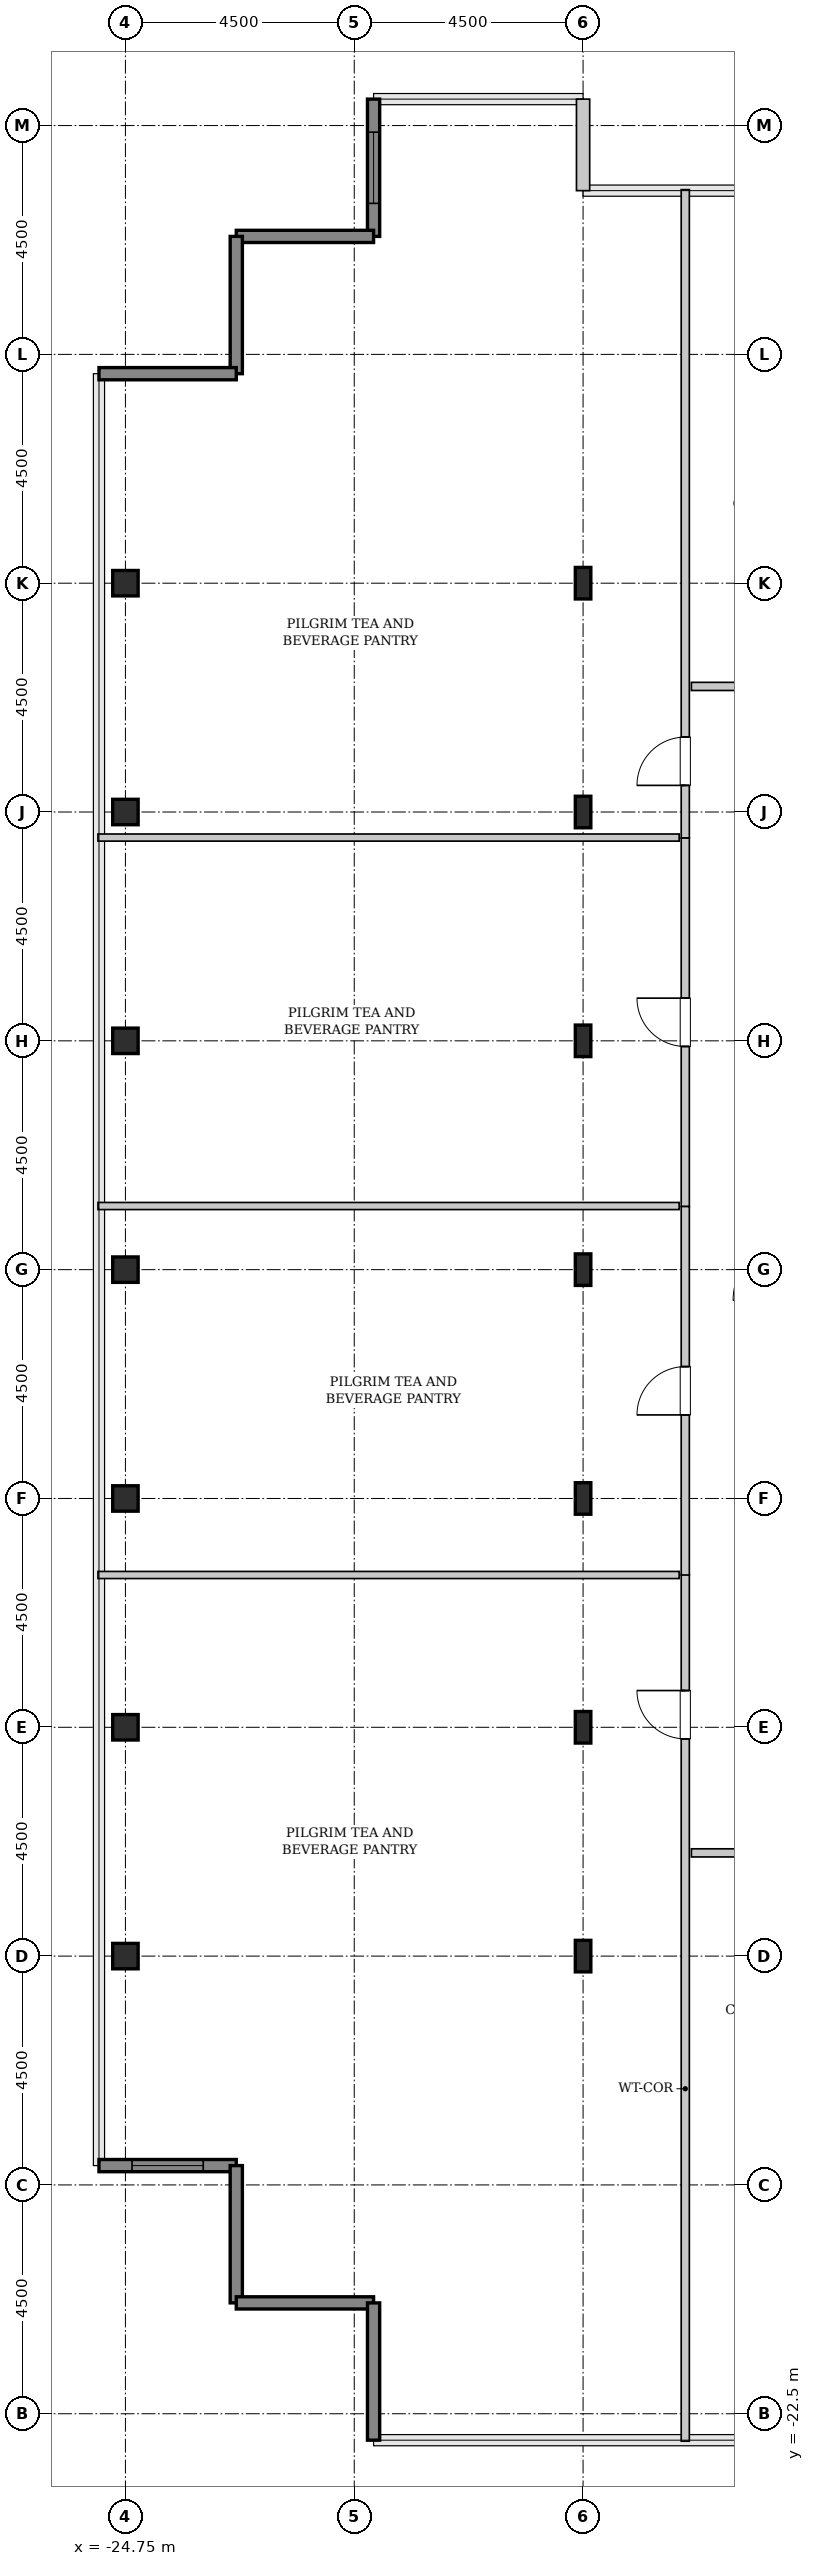
"""IFC4 building model, lengths in metres.
Left out: names, types, materials, properties, quantities, classifications, styles, units other than length and angle.
Written with IfcOpenShell. Run it as: python <this file> out.ifc"""

import sys

from ifc_helpers import new_model, si_unit, direction, frame, frame_2d, origin, origin_2d, place, context, subcontext, project, spatial, rectangle, hollow_rectangle, i_section, extrude, source, transform, mapped, element, fill, save


model = new_model("IFC4")
c1 = context("Model", 3, precision=1e-05, world=origin(), true_north=direction((0.0, 1.0)))
c2 = subcontext(c1, "Body", "Model", "MODEL_VIEW")
j1 = project(units=[si_unit("LENGTHUNIT", "METRE"), si_unit("PLANEANGLEUNIT", "RADIAN")], contexts=[c1])
p1 = place(None, origin())
s1 = spatial("IfcSite", under=j1, at=p1, CompositionType="ELEMENT")
p2 = place(p1, origin())
s2 = spatial("IfcBuilding", under=s1, at=p2, CompositionType="ELEMENT")
p3 = place(p2, frame((0.0, 0.0, 291.2)))
s3 = spatial("IfcBuildingStorey", under=s2, at=p3, CompositionType="ELEMENT", Elevation=291.2)
m1 = source(origin(), c2, "Body", "SweptSolid", [
    extrude(hollow_rectangle(XDim=0.5, YDim=0.5, WallThickness=0.025, InnerFilletRadius=0.025, OuterFilletRadius=0.05, at=origin_2d()), origin(), (0.0, 0.0, 1.0), 3.8),
])
for number, where, z_axis, x_axis in (
    (1, (-24.75, -13.5, 0.0), (0.0, 0.0, 1.0), (1.0, 0.0, 0.0)),
    (2, (-24.75, -9.0, 0.0), (0.0, 0.0, 1.0), (1.0, 0.0, 0.0)),
    (3, (-24.75, -4.5, 0.0), (0.0, 0.0, 1.0), (1.0, 0.0, 0.0)),
    (4, (-24.75, 0.0, 0.0), (0.0, 0.0, 1.0), (1.0, 0.0, 0.0)),
    (5, (-24.75, 4.5, 0.0), (0.0, 0.0, 1.0), (1.0, 0.0, 0.0)),
    (6, (-24.75, 9.0, 0.0), (0.0, 0.0, 1.0), (1.0, 0.0, 0.0)),
    (7, (-24.75, 13.5, 0.0), (0.0, 0.0, 1.0), (1.0, 0.0, 0.0)),
):
    element("IfcColumn", number, at=place(p3, frame(where, z_axis=z_axis, x_axis=x_axis)), inside=s3, PredefinedType="COLUMN", context=c2, shape_type="MappedRepresentation", body=[
        mapped(m1, transform((0.0, 0.0, 0.0), x_axis=(1.0, 0.0, 0.0), y_axis=(0.0, 1.0, 0.0), z_axis=(0.0, 0.0, 1.0), scale=1.0)),
    ])
m2 = source(origin(), c2, "Body", "SweptSolid", [
    extrude(i_section(OverallWidth=0.305, OverallDepth=0.62, WebThickness=0.021, FlangeThickness=0.04, FilletRadius=0.027, at=origin_2d()), origin(), (0.0, 0.0, 1.0), 3.8),
])
for number, where, z_axis, x_axis in (
    (8, (-15.75, -13.5, 0.0), (0.0, 0.0, 1.0), (1.0, 0.0, 0.0)),
    (9, (-15.75, -9.0, 0.0), (0.0, 0.0, 1.0), (1.0, 0.0, 0.0)),
    (10, (-15.75, -4.5, 0.0), (0.0, 0.0, 1.0), (1.0, 0.0, 0.0)),
    (11, (-15.75, 0.0, 0.0), (0.0, 0.0, 1.0), (1.0, 0.0, 0.0)),
    (12, (-15.75, 4.5, 0.0), (0.0, 0.0, 1.0), (1.0, 0.0, 0.0)),
    (13, (-15.75, 9.0, 0.0), (0.0, 0.0, 1.0), (1.0, 0.0, 0.0)),
    (14, (-15.75, 13.5, 0.0), (0.0, 0.0, 1.0), (1.0, 0.0, 0.0)),
):
    element("IfcColumn", number, at=place(p3, frame(where, z_axis=z_axis, x_axis=x_axis)), inside=s3, PredefinedType="COLUMN", context=c2, shape_type="MappedRepresentation", body=[
        mapped(m2, transform((0.0, 0.0, 0.0), x_axis=(1.0, 0.0, 0.0), y_axis=(0.0, 1.0, 0.0), z_axis=(0.0, 0.0, 1.0), scale=1.0)),
    ])
m3 = source(origin(), c2, "Body", "SweptSolid", [
    extrude(rectangle(XDim=1.8, YDim=0.26, at=frame_2d((0.9, 0.0))), origin(), (0.0, 0.0, 1.0), 3.55),
])
p4 = place(p3, frame((-15.75, 21.22, 0.0), z_axis=(0.0, 0.0, 1.0), x_axis=(0.0, 1.0, 0.0)))
e15 = element("IfcWall", 15, at=p4, inside=s3, PredefinedType="SOLIDWALL", context=c2, shape_type="MappedRepresentation", body=[
    mapped(m3, transform((0.0, 0.0, 0.0), x_axis=(1.0, 0.0, 0.0), y_axis=(0.0, 1.0, 0.0), z_axis=(0.0, 0.0, 1.0), scale=1.0)),
])
m4 = source(origin(), c2, "Body", "SweptSolid", [
    extrude(rectangle(XDim=2.7, YDim=0.24, at=frame_2d((1.35, 0.0))), origin(), (0.0, 0.0, 1.0), 3.55),
])
p5 = place(p3, frame((-19.87, 23.02, 0.0), z_axis=(0.0, 0.0, 1.0), x_axis=(0.0, -1.0, 0.0)))
e16 = element("IfcWall", 16, at=p5, inside=s3, PredefinedType="SHEAR", context=c2, shape_type="MappedRepresentation", body=[
    mapped(m4, transform((0.0, 0.0, 0.0), x_axis=(1.0, 0.0, 0.0), y_axis=(0.0, 1.0, 0.0), z_axis=(0.0, 0.0, 1.0), scale=1.0)),
])
p6 = place(p5, frame((0.65, 0.0, 0.85)))
e17 = element("IfcOpeningElement", 17, at=p6, cuts=e16, PredefinedType="OPENING", context=c2, shape_type="SweptSolid", body=[
    extrude(rectangle(XDim=1.4, YDim=1.8, at=frame_2d((0.7, 0.9))), frame((0.0, 0.13, 0.0), z_axis=(0.0, -1.0, 0.0), x_axis=(1.0, 0.0, 0.0)), (0.0, 0.0, 1.0), 0.26),
])
for number, where, z_axis, x_axis in (
    (18, (-19.87, 20.32, 0.0), (0.0, 0.0, 1.0), (-1.0, 0.0, 0.0)),
    (19, (-22.57, 20.32, 0.0), (0.0, 0.0, 1.0), (0.0, -1.0, 0.0)),
    (20, (-22.57, 17.62, 0.0), (0.0, 0.0, 1.0), (-1.0, 0.0, 0.0)),
):
    element("IfcWall", number, at=place(p3, frame(where, z_axis=z_axis, x_axis=x_axis)), inside=s3, PredefinedType="SHEAR", context=c2, shape_type="MappedRepresentation", body=[
        mapped(m4, transform((0.0, 0.0, 0.0), x_axis=(1.0, 0.0, 0.0), y_axis=(0.0, 1.0, 0.0), z_axis=(0.0, 0.0, 1.0), scale=1.0)),
    ])
p7 = place(p3, frame((-25.27, -17.62, 0.0), z_axis=(0.0, 0.0, 1.0), x_axis=(1.0, 0.0, 0.0)))
e21 = element("IfcWall", 21, at=p7, inside=s3, PredefinedType="SHEAR", context=c2, shape_type="MappedRepresentation", body=[
    mapped(m4, transform((0.0, 0.0, 0.0), x_axis=(1.0, 0.0, 0.0), y_axis=(0.0, 1.0, 0.0), z_axis=(0.0, 0.0, 1.0), scale=1.0)),
])
p8 = place(p7, frame((0.65, 0.0, 0.85)))
e22 = element("IfcOpeningElement", 22, at=p8, cuts=e21, PredefinedType="OPENING", context=c2, shape_type="SweptSolid", body=[
    extrude(rectangle(XDim=1.4, YDim=1.8, at=frame_2d((0.7, 0.9))), frame((0.0, 0.13, 0.0), z_axis=(0.0, -1.0, 0.0), x_axis=(1.0, 0.0, 0.0)), (0.0, 0.0, 1.0), 0.26),
])
for number, where, z_axis, x_axis in (
    (23, (-22.57, -17.62, 0.0), (0.0, 0.0, 1.0), (0.0, -1.0, 0.0)),
    (24, (-22.57, -20.32, 0.0), (0.0, 0.0, 1.0), (1.0, 0.0, 0.0)),
    (25, (-19.87, -20.32, 0.0), (0.0, 0.0, 1.0), (0.0, -1.0, 0.0)),
):
    element("IfcWall", number, at=place(p3, frame(where, z_axis=z_axis, x_axis=x_axis)), inside=s3, PredefinedType="SHEAR", context=c2, shape_type="MappedRepresentation", body=[
        mapped(m4, transform((0.0, 0.0, 0.0), x_axis=(1.0, 0.0, 0.0), y_axis=(0.0, 1.0, 0.0), z_axis=(0.0, 0.0, 1.0), scale=1.0)),
    ])
m5 = source(origin(), c2, "Body", "SweptSolid", [
    extrude(rectangle(XDim=17.045, YDim=0.16, at=frame_2d((8.522, 0.0))), origin(), (0.0, 0.0, 1.0), 3.535),
])
p9 = place(p3, frame((-13.74, -23.04, 0.0), z_axis=(0.0, 0.0, 1.0), x_axis=(0.0, 1.0, 0.0)))
e26 = element("IfcWall", 26, at=p9, inside=s3, PredefinedType="PARTITIONING", context=c2, shape_type="MappedRepresentation", body=[
    mapped(m5, transform((0.0, 0.0, 0.0), x_axis=(1.0, 0.0, 0.0), y_axis=(0.0, 1.0, 0.0), z_axis=(0.0, 0.0, 1.0), scale=1.0)),
])
p10 = place(p9, frame((13.812, 0.0, 0.0)))
e27 = element("IfcOpeningElement", 27, at=p10, cuts=e26, PredefinedType="OPENING", context=c2, shape_type="SweptSolid", body=[
    extrude(rectangle(XDim=0.95, YDim=2.1, at=frame_2d((0.475, 1.05))), frame((0.0, 0.09, 0.0), z_axis=(0.0, -1.0, 0.0), x_axis=(1.0, 0.0, 0.0)), (0.0, 0.0, 1.0), 0.18),
])
m6 = source(origin(), c2, "Body", "SweptSolid", [
    extrude(rectangle(XDim=11.43, YDim=0.14, at=frame_2d((5.715, 0.0))), origin(), (0.0, 0.0, 1.0), 3.535),
])
p11 = place(p3, frame((-25.29, -6.005, 0.0), z_axis=(0.0, 0.0, 1.0), x_axis=(1.0, 0.0, 0.0)))
e28 = element("IfcWall", 28, at=p11, inside=s3, PredefinedType="PARTITIONING", context=c2, shape_type="MappedRepresentation", body=[
    mapped(m6, transform((0.0, 0.0, 0.0), x_axis=(1.0, 0.0, 0.0), y_axis=(0.0, 1.0, 0.0), z_axis=(0.0, 0.0, 1.0), scale=1.0)),
])
m7 = source(origin(), c2, "Body", "SweptSolid", [
    extrude(rectangle(XDim=12.752, YDim=0.16, at=frame_2d((6.376, 0.0))), origin(), (0.0, 0.0, 1.0), 3.535),
])
p12 = place(p3, frame((-13.74, 8.488, 0.0), z_axis=(0.0, 0.0, 1.0), x_axis=(0.0, 1.0, 0.0)))
e29 = element("IfcWall", 29, at=p12, inside=s3, PredefinedType="PARTITIONING", context=c2, shape_type="MappedRepresentation", body=[
    mapped(m7, transform((0.0, 0.0, 0.0), x_axis=(1.0, 0.0, 0.0), y_axis=(0.0, 1.0, 0.0), z_axis=(0.0, 0.0, 1.0), scale=1.0)),
])
p13 = place(p12, frame((1.036, 0.0, 0.0)))
e30 = element("IfcOpeningElement", 30, at=p13, cuts=e29, PredefinedType="OPENING", context=c2, shape_type="SweptSolid", body=[
    extrude(rectangle(XDim=0.95, YDim=2.1, at=frame_2d((0.475, 1.05))), frame((0.0, 0.09, 0.0), z_axis=(0.0, -1.0, 0.0), x_axis=(1.0, 0.0, 0.0)), (0.0, 0.0, 1.0), 0.18),
])
m8 = source(origin(), c2, "Body", "SweptSolid", [
    extrude(rectangle(XDim=11.43, YDim=0.14, at=frame_2d((5.715, 0.0))), origin(), (0.0, 0.0, 1.0), 2.925),
])
p14 = place(p3, frame((-25.29, 8.498, 0.0), z_axis=(0.0, 0.0, 1.0), x_axis=(1.0, 0.0, 0.0)))
e31 = element("IfcWall", 31, at=p14, inside=s3, PredefinedType="PARTITIONING", context=c2, shape_type="MappedRepresentation", body=[
    mapped(m8, transform((0.0, 0.0, 0.0), x_axis=(1.0, 0.0, 0.0), y_axis=(0.0, 1.0, 0.0), z_axis=(0.0, 0.0, 1.0), scale=1.0)),
])
m9 = source(origin(), c2, "Body", "SweptSolid", [
    extrude(rectangle(XDim=7.246, YDim=0.16, at=frame_2d((3.623, 0.0))), origin(), (0.0, 0.0, 1.0), 3.535),
])
p15 = place(p3, frame((-13.74, 1.241, 0.0), z_axis=(0.0, 0.0, 1.0), x_axis=(0.0, 1.0, 0.0)))
e32 = element("IfcWall", 32, at=p15, inside=s3, PredefinedType="PARTITIONING", context=c2, shape_type="MappedRepresentation", body=[
    mapped(m9, transform((0.0, 0.0, 0.0), x_axis=(1.0, 0.0, 0.0), y_axis=(0.0, 1.0, 0.0), z_axis=(0.0, 0.0, 1.0), scale=1.0)),
])
p16 = place(p15, frame((3.148, 0.0, 0.0)))
e33 = element("IfcOpeningElement", 33, at=p16, cuts=e32, PredefinedType="OPENING", context=c2, shape_type="SweptSolid", body=[
    extrude(rectangle(XDim=0.95, YDim=2.1, at=frame_2d((0.475, 1.05))), frame((0.0, 0.09, 0.0), z_axis=(0.0, -1.0, 0.0), x_axis=(1.0, 0.0, 0.0)), (0.0, 0.0, 1.0), 0.18),
])
p17 = place(p3, frame((-25.29, 1.251, 0.0), z_axis=(0.0, 0.0, 1.0), x_axis=(1.0, 0.0, 0.0)))
e34 = element("IfcWall", 34, at=p17, inside=s3, PredefinedType="PARTITIONING", context=c2, shape_type="MappedRepresentation", body=[
    mapped(m6, transform((0.0, 0.0, 0.0), x_axis=(1.0, 0.0, 0.0), y_axis=(0.0, 1.0, 0.0), z_axis=(0.0, 0.0, 1.0), scale=1.0)),
])
m10 = source(origin(), c2, "Body", "SweptSolid", [
    extrude(rectangle(XDim=7.246, YDim=0.16, at=frame_2d((3.623, 0.0))), origin(), (0.0, 0.0, 1.0), 3.535),
])
p18 = place(p3, frame((-13.74, -6.005, 0.0), z_axis=(0.0, 0.0, 1.0), x_axis=(0.0, 1.0, 0.0)))
e35 = element("IfcWall", 35, at=p18, inside=s3, PredefinedType="PARTITIONING", context=c2, shape_type="MappedRepresentation", body=[
    mapped(m10, transform((0.0, 0.0, 0.0), x_axis=(1.0, 0.0, 0.0), y_axis=(0.0, 1.0, 0.0), z_axis=(0.0, 0.0, 1.0), scale=1.0)),
])
p19 = place(p18, frame((3.148, 0.0, 0.0)))
e36 = element("IfcOpeningElement", 36, at=p19, cuts=e35, PredefinedType="OPENING", context=c2, shape_type="SweptSolid", body=[
    extrude(rectangle(XDim=0.95, YDim=2.1, at=frame_2d((0.475, 1.05))), frame((0.0, 0.09, 0.0), z_axis=(0.0, -1.0, 0.0), x_axis=(1.0, 0.0, 0.0)), (0.0, 0.0, 1.0), 0.18),
])
m11 = source(origin(), c2, "Body", "SweptSolid", [
    extrude(rectangle(XDim=4.125, YDim=0.16, at=frame_2d((2.062, 0.0))), origin(), (0.0, 0.0, 1.0), 3.535),
])
p20 = place(p3, frame((-13.62, 11.47, 0.0), z_axis=(0.0, 0.0, 1.0), x_axis=(1.0, 0.0, 0.0)))
e37 = element("IfcWall", 37, at=p20, inside=s3, PredefinedType="PARTITIONING", context=c2, shape_type="MappedRepresentation", body=[
    mapped(m11, transform((0.0, 0.0, 0.0), x_axis=(1.0, 0.0, 0.0), y_axis=(0.0, 1.0, 0.0), z_axis=(0.0, 0.0, 1.0), scale=1.0)),
])
p21 = place(p20, frame((1.587, 0.0, 0.0)))
e38 = element("IfcOpeningElement", 38, at=p21, cuts=e37, PredefinedType="OPENING", context=c2, shape_type="SweptSolid", body=[
    extrude(rectangle(XDim=0.95, YDim=2.1, at=frame_2d((0.475, 1.05))), frame((0.0, 0.09, 0.0), z_axis=(0.0, -1.0, 0.0), x_axis=(1.0, 0.0, 0.0)), (0.0, 0.0, 1.0), 0.18),
])
m12 = source(origin(), c2, "Body", "SweptSolid", [
    extrude(rectangle(XDim=3.825, YDim=0.16, at=frame_2d((1.913, 0.0))), origin(), (0.0, 0.0, 1.0), 3.535),
])
p22 = place(p3, frame((-13.62, -11.47, 0.0), z_axis=(0.0, 0.0, 1.0), x_axis=(1.0, 0.0, 0.0)))
e39 = element("IfcWall", 39, at=p22, inside=s3, PredefinedType="PARTITIONING", context=c2, shape_type="MappedRepresentation", body=[
    mapped(m12, transform((0.0, 0.0, 0.0), x_axis=(1.0, 0.0, 0.0), y_axis=(0.0, 1.0, 0.0), z_axis=(0.0, 0.0, 1.0), scale=1.0)),
])
p23 = place(p22, frame((1.438, 0.0, 0.0)))
e40 = element("IfcOpeningElement", 40, at=p23, cuts=e39, PredefinedType="OPENING", context=c2, shape_type="SweptSolid", body=[
    extrude(rectangle(XDim=0.95, YDim=2.1, at=frame_2d((0.475, 1.05))), frame((0.0, 0.09, 0.0), z_axis=(0.0, -1.0, 0.0), x_axis=(1.0, 0.0, 0.0)), (0.0, 0.0, 1.0), 0.18),
])
m13 = source(origin(), c2, "Body", "SweptSolid", [
    extrude(rectangle(XDim=1.4, YDim=1.8, at=frame_2d((0.7, 0.9))), frame((0.0, 0.03, 0.0), z_axis=(0.0, -1.0, 0.0), x_axis=(1.0, 0.0, 0.0)), (0.0, 0.0, 1.0), 0.06),
])
p24 = place(p6, origin())
e41 = element("IfcWindow", 41, at=p24, inside=s3, PartitioningType="SINGLE_PANEL", PredefinedType="WINDOW", context=c2, shape_type="MappedRepresentation", body=[
    mapped(m13, transform((0.0, 0.0, 0.0), x_axis=(1.0, 0.0, 0.0), y_axis=(0.0, 1.0, 0.0), z_axis=(0.0, 0.0, 1.0), scale=1.0)),
])
fill(e17, e41)
p25 = place(p8, origin())
e42 = element("IfcWindow", 42, at=p25, inside=s3, PartitioningType="SINGLE_PANEL", PredefinedType="WINDOW", context=c2, shape_type="MappedRepresentation", body=[
    mapped(m13, transform((0.0, 0.0, 0.0), x_axis=(1.0, 0.0, 0.0), y_axis=(0.0, 1.0, 0.0), z_axis=(0.0, 0.0, 1.0), scale=1.0)),
])
fill(e22, e42)
m14 = source(origin(), c2, "Body", "SweptSolid", [
    extrude(rectangle(XDim=0.95, YDim=2.1, at=frame_2d((0.475, 1.05))), frame((0.0, 0.025, 0.0), z_axis=(0.0, -1.0, 0.0), x_axis=(1.0, 0.0, 0.0)), (0.0, 0.0, 1.0), 0.05),
])
p26 = place(p10, origin())
e43 = element("IfcDoor", 43, at=p26, inside=s3, OperationType="SINGLE_SWING_RIGHT", PredefinedType="DOOR", context=c2, shape_type="MappedRepresentation", body=[
    mapped(m14, transform((0.0, 0.0, 0.0), x_axis=(1.0, 0.0, 0.0), y_axis=(0.0, 1.0, 0.0), z_axis=(0.0, 0.0, 1.0), scale=1.0)),
])
fill(e27, e43)
p27 = place(p13, origin())
e44 = element("IfcDoor", 44, at=p27, inside=s3, OperationType="SINGLE_SWING_LEFT", PredefinedType="DOOR", context=c2, shape_type="MappedRepresentation", body=[
    mapped(m14, transform((0.0, 0.0, 0.0), x_axis=(1.0, 0.0, 0.0), y_axis=(0.0, 1.0, 0.0), z_axis=(0.0, 0.0, 1.0), scale=1.0)),
])
fill(e30, e44)
p28 = place(p16, origin())
e45 = element("IfcDoor", 45, at=p28, inside=s3, OperationType="SINGLE_SWING_RIGHT", PredefinedType="DOOR", context=c2, shape_type="MappedRepresentation", body=[
    mapped(m14, transform((0.0, 0.0, 0.0), x_axis=(1.0, 0.0, 0.0), y_axis=(0.0, 1.0, 0.0), z_axis=(0.0, 0.0, 1.0), scale=1.0)),
])
fill(e33, e45)
p29 = place(p19, origin())
e46 = element("IfcDoor", 46, at=p29, inside=s3, OperationType="SINGLE_SWING_LEFT", PredefinedType="DOOR", context=c2, shape_type="MappedRepresentation", body=[
    mapped(m14, transform((0.0, 0.0, 0.0), x_axis=(1.0, 0.0, 0.0), y_axis=(0.0, 1.0, 0.0), z_axis=(0.0, 0.0, 1.0), scale=1.0)),
])
fill(e36, e46)
save(model, sys.argv[1])
